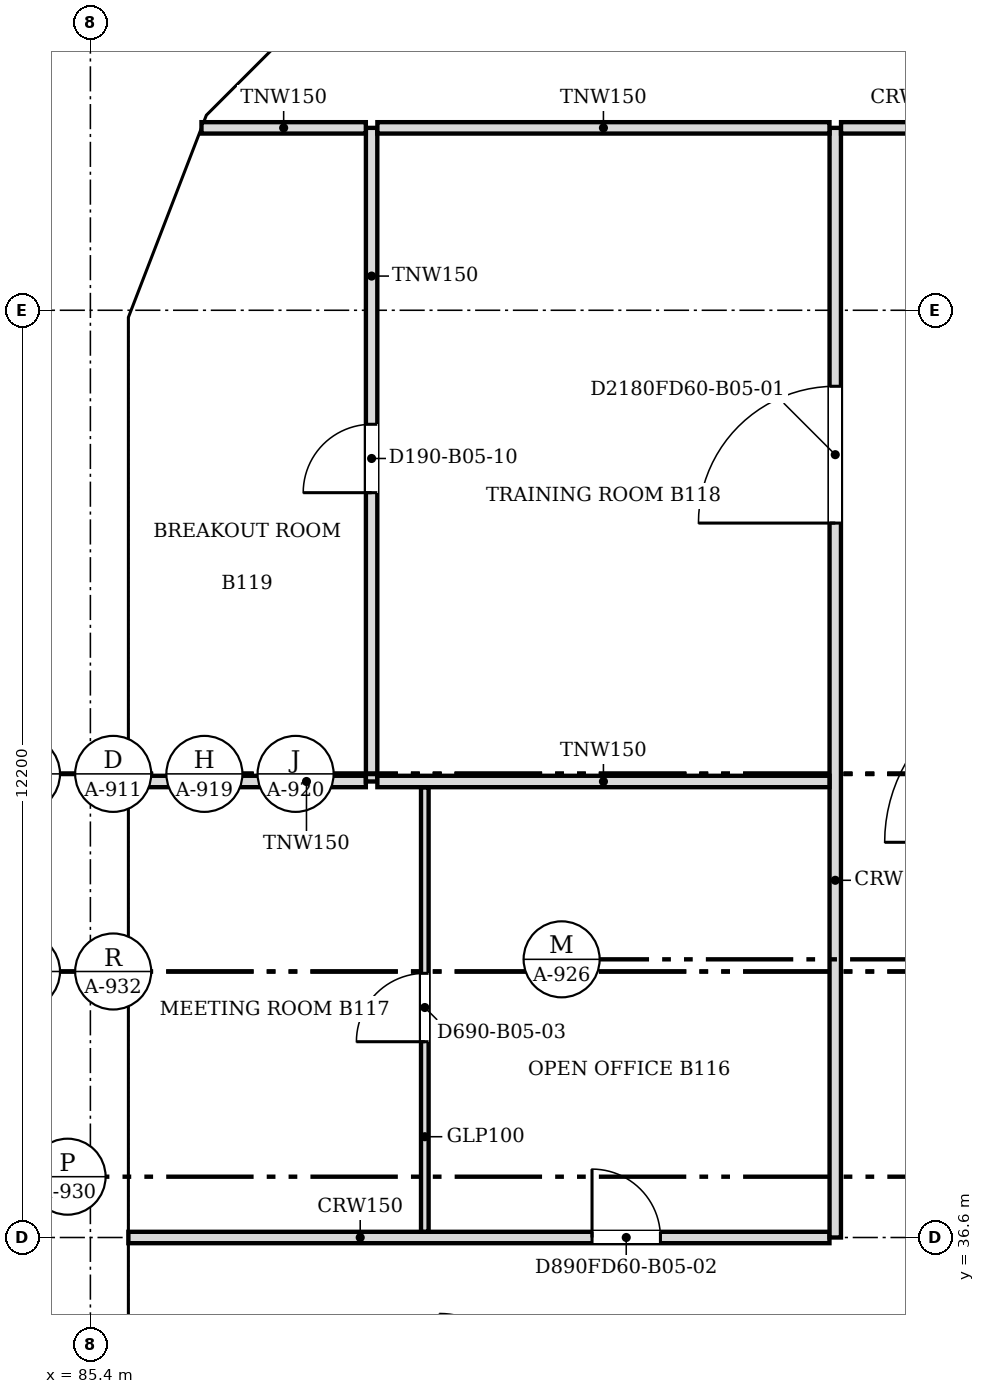
"""IFC4 building model, lengths in metres.
Left out: names, types, materials, properties, quantities, classifications, styles, units other than length and angle.
Written with IfcOpenShell. Run it as: python <this file> out.ifc"""

import sys

from ifc_helpers import new_model, si_unit, direction, frame, frame_2d, origin, place, context, subcontext, project, spatial, polyline, rectangle, outline, extrude, faceted_brep, source, transform, mapped, element, fill, save


model = new_model("IFC4")
c1 = context("Model", 3, precision=1e-05, world=origin(), true_north=direction((0.0, 1.0)))
c2 = subcontext(c1, "Body", "Model", "MODEL_VIEW")
j1 = project(units=[si_unit("LENGTHUNIT", "METRE"), si_unit("PLANEANGLEUNIT", "RADIAN")], contexts=[c1])
p1 = place(None, origin())
s1 = spatial("IfcSite", under=j1, at=p1, CompositionType="ELEMENT")
p2 = place(p1, origin())
s2 = spatial("IfcBuilding", under=s1, at=p2, CompositionType="ELEMENT")
p3 = place(p2, frame((0.0, 0.0, 48.6)))
s3 = spatial("IfcBuildingStorey", under=s2, at=p3, CompositionType="ELEMENT", Elevation=48.6)
m1 = source(origin(), c2, "Body", "Brep", [
    faceted_brep([(2.944, -0.25, 0.0), (2.997, -0.25, 0.068), (2.997, -0.25, 7.532), (2.944, -0.25, 7.6), (0.0, -0.25, 3.8), (0.053, 0.25, 3.868), (2.891, 0.25, 7.532), (2.891, 0.25, 0.068), (0.053, 0.25, 3.732), (2.944, 0.0, 0.0), (2.944, 0.0, 7.6), (0.0, 0.0, 3.8)], [[[0, 1, 2, 3, 4]], [[5, 6, 7, 8]], [[1, 0, 9]], [[10, 3, 2]], [[6, 5, 11, 4, 3, 10]], [[8, 7, 9, 0, 4, 11]], [[8, 11, 5]], [[1, 9, 7, 6, 10, 2]]]),
])
p4 = place(p3, frame((88.794, 53.588, -3.8), z_axis=(0.0, 0.0, 1.0), x_axis=(-0.707066050402, -0.707147509625, 0.0)))
e1 = element("IfcWall", 1, at=p4, inside=s3, PredefinedType="SOLIDWALL", context=c2, shape_type="MappedRepresentation", body=[
    mapped(m1, transform((0.0, 0.0, 0.0), scale=1.0)),
])
m2 = source(origin(), c2, "Body", "SweptSolid", [
    extrude(outline(polyline([(2.744, 6.934), (0.316, 3.8), (2.744, 0.666), (2.744, 6.934)])), frame((0.0, 0.26, 0.0), z_axis=(0.0, -1.0, 0.0), x_axis=(1.0, 0.0, 0.0)), (0.0, 0.0, 1.0), 0.52),
])
p5 = place(p4, origin())
e2 = element("IfcOpeningElement", 2, at=p5, cuts=e1, PredefinedType="OPENING", context=c2, shape_type="MappedRepresentation", body=[
    mapped(m2, transform((0.0, 0.0, 0.0), scale=1.0)),
])
m3 = source(origin(), c2, "Body", "Brep", [
    faceted_brep([(0.053, -0.25, 0.0), (3.003, -0.25, 3.8), (0.053, -0.25, 7.6), (0.0, -0.25, 7.531), (0.0, -0.25, 0.068), (0.106, 0.25, 7.532), (2.957, 0.25, 3.86), (2.957, 0.25, 3.74), (0.106, 0.25, 0.068), (3.003, 0.0, 3.8), (0.053, 0.0, 0.0), (0.053, 0.0, 7.6)], [[[0, 1, 2, 3, 4]], [[5, 6, 7, 8]], [[8, 7, 9, 1, 0, 10]], [[6, 5, 11, 2, 1, 9]], [[3, 2, 11]], [[10, 0, 4]], [[8, 10, 4, 3, 11, 5]], [[7, 6, 9]]]),
])
p6 = place(p3, frame((86.731, 51.556, -3.8), z_axis=(0.0, 0.0, 1.0), x_axis=(-0.359855894603, -0.933007896601, 0.0)))
e3 = element("IfcWall", 3, at=p6, inside=s3, PredefinedType="SOLIDWALL", context=c2, shape_type="MappedRepresentation", body=[
    mapped(m3, transform((0.0, 0.0, 0.0), scale=1.0)),
])
m4 = source(origin(), c2, "Body", "SweptSolid", [
    extrude(outline(polyline([(0.253, 0.665), (2.687, 3.8), (0.253, 6.935), (0.253, 0.665)])), frame((0.0, 0.26, 0.0), z_axis=(0.0, -1.0, 0.0), x_axis=(1.0, 0.0, 0.0)), (0.0, 0.0, 1.0), 0.52),
])
p7 = place(p6, origin())
e4 = element("IfcOpeningElement", 4, at=p7, cuts=e3, PredefinedType="OPENING", context=c2, shape_type="MappedRepresentation", body=[
    mapped(m4, transform((0.0, 0.0, 0.0), scale=1.0)),
])
m5 = source(origin(), c2, "Body", "Brep", [
    faceted_brep([(3.003, -0.25, 0.0), (6.053, -0.25, 3.8), (3.003, -0.25, 7.6), (0.0, -0.25, 3.8), (0.047, 0.25, 3.859), (3.003, 0.25, 7.6), (6.053, 0.25, 3.8), (3.003, 0.25, 0.0), (0.047, 0.25, 3.741), (0.0, 0.0, 3.8)], [[[0, 1, 2, 3]], [[4, 5, 6, 7, 8]], [[7, 6, 1, 0]], [[6, 5, 2, 1]], [[5, 4, 9, 3, 2]], [[8, 7, 0, 3, 9]], [[8, 9, 4]]]),
])
p8 = place(p3, frame((85.65, 48.753, -3.8), z_axis=(0.0, 0.0, 1.0), x_axis=(0.0, -1.0, 0.0)))
e5 = element("IfcWall", 5, at=p8, inside=s3, PredefinedType="SOLIDWALL", context=c2, shape_type="MappedRepresentation", body=[
    mapped(m5, transform((0.0, 0.0, 0.0), scale=1.0)),
])
m6 = source(origin(), c2, "Body", "SweptSolid", [
    extrude(outline(polyline([(3.005, 0.401), (5.733, 3.8), (3.005, 7.199), (0.319, 3.8), (3.005, 0.401)])), frame((0.0, 0.26, 0.0), z_axis=(0.0, -1.0, 0.0), x_axis=(1.0, 0.0, 0.0)), (0.0, 0.0, 1.0), 0.52),
])
p9 = place(p8, origin())
e6 = element("IfcOpeningElement", 6, at=p9, cuts=e5, PredefinedType="OPENING", context=c2, shape_type="MappedRepresentation", body=[
    mapped(m6, transform((0.0, 0.0, 0.0), scale=1.0)),
])
m7 = source(origin(), c2, "Body", "Brep", [
    faceted_brep([(3.05, -0.25, 0.0), (6.1, -0.25, 3.8), (6.1, -0.25, 3.8), (3.05, -0.25, 7.6), (0.0, -0.25, 3.8), (0.0, 0.25, 3.8), (3.05, 0.25, 7.6), (6.1, 0.25, 3.8), (6.1, 0.25, 3.8), (3.05, 0.25, 0.0)], [[[0, 1, 2, 3, 4]], [[5, 6, 7, 8, 9]], [[9, 8, 1, 0]], [[7, 6, 3, 2]], [[6, 5, 4, 3]], [[5, 9, 0, 4]], [[1, 8, 7, 2]]]),
])
p10 = place(p3, frame((85.65, 42.7, -3.8), z_axis=(0.0, 0.0, 1.0), x_axis=(0.0, -1.0, 0.0)))
e7 = element("IfcWall", 7, at=p10, inside=s3, PredefinedType="SOLIDWALL", context=c2, shape_type="MappedRepresentation", body=[
    mapped(m7, transform((0.0, 0.0, 0.0), scale=1.0)),
])
m8 = source(origin(), c2, "Body", "SweptSolid", [
    extrude(outline(polyline([(3.05, 0.399), (5.78, 3.8), (3.05, 7.2), (0.321, 3.8), (3.05, 0.399)])), frame((0.0, 0.26, 0.0), z_axis=(0.0, -1.0, 0.0), x_axis=(1.0, 0.0, 0.0)), (0.0, 0.0, 1.0), 0.52),
])
p11 = place(p10, origin())
e8 = element("IfcOpeningElement", 8, at=p11, cuts=e7, PredefinedType="OPENING", context=c2, shape_type="MappedRepresentation", body=[
    mapped(m8, transform((0.0, 0.0, 0.0), scale=1.0)),
])
m9 = source(origin(), c2, "Body", "SweptSolid", [
    extrude(outline(polyline([(3.05, 0.0), (6.1, 3.8), (3.05, 7.6), (0.0, 3.8), (3.05, 0.0)])), frame((0.0, 0.25, 0.0), z_axis=(0.0, -1.0, 0.0), x_axis=(1.0, 0.0, 0.0)), (0.0, 0.0, 1.0), 0.5),
])
p12 = place(p3, frame((85.65, 36.6, -3.8), z_axis=(0.0, 0.0, 1.0), x_axis=(0.0, -1.0, 0.0)))
e9 = element("IfcWall", 9, at=p12, inside=s3, PredefinedType="SOLIDWALL", context=c2, shape_type="MappedRepresentation", body=[
    mapped(m9, transform((0.0, 0.0, 0.0), scale=1.0)),
])
p13 = place(p12, origin())
e10 = element("IfcOpeningElement", 10, at=p13, cuts=e9, PredefinedType="OPENING", context=c2, shape_type="MappedRepresentation", body=[
    mapped(m8, transform((0.0, 0.0, 0.0), scale=1.0)),
])
p14 = place(p2, frame((0.0, 0.0, 52.4)))
s4 = spatial("IfcBuildingStorey", under=s2, at=p14, CompositionType="ELEMENT", Elevation=52.4)
m10 = source(origin(), c2, "Body", "Brep", [
    faceted_brep([(0.053, -0.25, 0.0), (2.997, -0.25, 3.8), (0.053, -0.25, 7.6), (0.0, -0.25, 7.532), (0.0, -0.25, 0.068), (0.106, 0.25, 7.531), (2.944, 0.25, 3.868), (2.944, 0.25, 3.732), (0.106, 0.25, 0.068), (2.997, 0.0, 3.8), (0.053, 0.0, 0.0), (0.053, 0.0, 7.6)], [[[0, 1, 2, 3, 4]], [[5, 6, 7, 8]], [[8, 7, 9, 1, 0, 10]], [[6, 5, 11, 2, 1, 9]], [[3, 2, 11]], [[10, 0, 4]], [[8, 10, 4, 3, 11, 5]], [[9, 7, 6]]]),
])
p15 = place(p14, frame((88.831, 53.625, -3.8), z_axis=(0.0, 0.0, 1.0), x_axis=(-0.707147509625, -0.707066050402, 0.0)))
e11 = element("IfcWall", 11, at=p15, inside=s4, PredefinedType="SOLIDWALL", context=c2, shape_type="MappedRepresentation", body=[
    mapped(m10, transform((0.0, 0.0, 0.0), scale=1.0)),
])
m11 = source(origin(), c2, "Body", "SweptSolid", [
    extrude(outline(polyline([(0.253, 0.666), (2.681, 3.8), (0.253, 6.934), (0.253, 0.666)])), frame((0.0, 0.26, 0.0), z_axis=(0.0, -1.0, 0.0), x_axis=(1.0, 0.0, 0.0)), (0.0, 0.0, 1.0), 0.52),
])
p16 = place(p15, origin())
e12 = element("IfcOpeningElement", 12, at=p16, cuts=e11, PredefinedType="OPENING", context=c2, shape_type="MappedRepresentation", body=[
    mapped(m11, transform((0.0, 0.0, 0.0), scale=1.0)),
])
m12 = source(origin(), c2, "Body", "Brep", [
    faceted_brep([(2.95, -0.25, 0.0), (2.997, -0.25, 0.059), (2.997, -0.25, 7.541), (2.95, -0.25, 7.6), (0.0, -0.25, 3.8), (0.053, 0.25, 3.868), (2.904, 0.25, 7.54), (2.904, 0.25, 0.06), (0.053, 0.25, 3.732), (2.95, 0.0, 0.0), (2.95, 0.0, 7.6), (0.0, 0.0, 3.8)], [[[0, 1, 2, 3, 4]], [[5, 6, 7, 8]], [[1, 0, 9]], [[10, 3, 2]], [[6, 5, 11, 4, 3, 10]], [[8, 7, 9, 0, 4, 11]], [[8, 11, 5]], [[1, 9, 7, 6, 10, 2]]]),
])
p17 = place(p14, frame((86.712, 51.506, -3.8), z_axis=(0.0, 0.0, 1.0), x_axis=(-0.359874094142, -0.933000876937, 0.0)))
e13 = element("IfcWall", 13, at=p17, inside=s4, PredefinedType="SOLIDWALL", context=c2, shape_type="MappedRepresentation", body=[
    mapped(m12, transform((0.0, 0.0, 0.0), scale=1.0)),
])
m13 = source(origin(), c2, "Body", "SweptSolid", [
    extrude(outline(polyline([(2.75, 6.935), (0.316, 3.8), (2.75, 0.665), (2.75, 6.935)])), frame((0.0, 0.26, 0.0), z_axis=(0.0, -1.0, 0.0), x_axis=(1.0, 0.0, 0.0)), (0.0, 0.0, 1.0), 0.52),
])
p18 = place(p17, origin())
e14 = element("IfcOpeningElement", 14, at=p18, cuts=e13, PredefinedType="OPENING", context=c2, shape_type="MappedRepresentation", body=[
    mapped(m13, transform((0.0, 0.0, 0.0), scale=1.0)),
])
m14 = source(origin(), c2, "Body", "Brep", [
    faceted_brep([(0.047, -0.25, 0.0), (3.05, -0.25, 3.8), (0.047, -0.25, 7.6), (0.0, -0.25, 7.54), (0.0, -0.25, 0.06), (0.093, 0.25, 7.541), (3.05, 0.25, 3.8), (0.093, 0.25, 0.059), (0.047, 0.0, 0.0), (0.047, 0.0, 7.6)], [[[0, 1, 2, 3, 4]], [[5, 6, 7]], [[7, 6, 1, 0, 8]], [[6, 5, 9, 2, 1]], [[3, 2, 9]], [[8, 0, 4]], [[7, 8, 4, 3, 9, 5]]]),
])
p19 = place(p14, frame((85.65, 48.8, -3.8), z_axis=(0.0, 0.0, 1.0), x_axis=(0.0, -1.0, 0.0)))
e15 = element("IfcWall", 15, at=p19, inside=s4, PredefinedType="SOLIDWALL", context=c2, shape_type="MappedRepresentation", body=[
    mapped(m14, transform((0.0, 0.0, 0.0), scale=1.0)),
])
m15 = source(origin(), c2, "Body", "SweptSolid", [
    extrude(outline(polyline([(0.247, 0.656), (2.731, 3.8), (0.247, 6.944), (0.247, 0.656)])), frame((0.0, 0.26, 0.0), z_axis=(0.0, -1.0, 0.0), x_axis=(1.0, 0.0, 0.0)), (0.0, 0.0, 1.0), 0.52),
])
p20 = place(p19, origin())
e16 = element("IfcOpeningElement", 16, at=p20, cuts=e15, PredefinedType="OPENING", context=c2, shape_type="MappedRepresentation", body=[
    mapped(m15, transform((0.0, 0.0, 0.0), scale=1.0)),
])
m16 = source(origin(), c2, "Body", "SweptSolid", [
    extrude(outline(polyline([(3.05, 0.0), (6.1, 3.8), (3.05, 7.6), (0.0, 3.8), (3.05, 0.0)])), frame((0.0, 0.25, 0.0), z_axis=(0.0, -1.0, 0.0), x_axis=(1.0, 0.0, 0.0)), (0.0, 0.0, 1.0), 0.5),
])
p21 = place(p14, frame((85.65, 45.75, -3.8), z_axis=(0.0, 0.0, 1.0), x_axis=(0.0, -1.0, 0.0)))
e17 = element("IfcWall", 17, at=p21, inside=s4, PredefinedType="SOLIDWALL", context=c2, shape_type="MappedRepresentation", body=[
    mapped(m16, transform((0.0, 0.0, 0.0), scale=1.0)),
])
m17 = source(origin(), c2, "Body", "SweptSolid", [
    extrude(outline(polyline([(3.05, 0.399), (5.78, 3.8), (3.05, 7.2), (0.321, 3.8), (3.05, 0.399)])), frame((0.0, 0.26, 0.0), z_axis=(0.0, -1.0, 0.0), x_axis=(1.0, 0.0, 0.0)), (0.0, 0.0, 1.0), 0.52),
])
p22 = place(p21, origin())
e18 = element("IfcOpeningElement", 18, at=p22, cuts=e17, PredefinedType="OPENING", context=c2, shape_type="MappedRepresentation", body=[
    mapped(m17, transform((0.0, 0.0, 0.0), scale=1.0)),
])
m18 = source(origin(), c2, "Body", "Brep", [
    faceted_brep([(3.05, -0.25, 0.0), (6.1, -0.25, 3.8), (6.1, -0.25, 3.8), (3.05, -0.25, 7.6), (0.0, -0.25, 3.8), (0.0, 0.25, 3.8), (3.05, 0.25, 7.6), (6.1, 0.25, 3.8), (6.1, 0.25, 3.8), (3.05, 0.25, 0.0)], [[[0, 1, 2, 3, 4]], [[5, 6, 7, 8, 9]], [[9, 8, 1, 0]], [[7, 6, 3, 2]], [[6, 5, 4, 3]], [[5, 9, 0, 4]], [[1, 8, 7, 2]]]),
])
p23 = place(p14, frame((85.65, 39.65, -3.8), z_axis=(0.0, 0.0, 1.0), x_axis=(0.0, -1.0, 0.0)))
e19 = element("IfcWall", 19, at=p23, inside=s4, PredefinedType="SOLIDWALL", context=c2, shape_type="MappedRepresentation", body=[
    mapped(m18, transform((0.0, 0.0, 0.0), scale=1.0)),
])
p24 = place(p23, origin())
e20 = element("IfcOpeningElement", 20, at=p24, cuts=e19, PredefinedType="OPENING", context=c2, shape_type="MappedRepresentation", body=[
    mapped(m17, transform((0.0, 0.0, 0.0), scale=1.0)),
])
p25 = place(p3, frame((85.9, 36.6, 0.0), z_axis=(0.0, 0.0, 1.0), x_axis=(1.0, 0.0, 0.0)))
e21 = element("IfcWall", 21, at=p25, inside=s3, PredefinedType="PARTITIONING", context=c2, shape_type="SweptSolid", body=[
    extrude(rectangle(XDim=9.224, YDim=0.15, at=frame_2d((4.612, 0.0))), origin(), (0.0, 0.0, 1.0), 3.067),
])
m19 = source(origin(), c2, "Body", "SweptSolid", [
    extrude(rectangle(XDim=0.9, YDim=2.1, at=frame_2d((0.45, 1.05))), frame((0.0, 0.085, 0.0), z_axis=(0.0, -1.0, 0.0), x_axis=(1.0, 0.0, 0.0)), (0.0, 0.0, 1.0), 0.17),
])
p26 = place(p25, frame((6.1, 0.0, 0.0)))
e22 = element("IfcOpeningElement", 22, at=p26, cuts=e21, PredefinedType="OPENING", context=c2, shape_type="MappedRepresentation", body=[
    mapped(m19, transform((0.0, 0.0, 0.0), scale=1.0)),
])
p27 = place(p3, frame((95.2, 36.6, 0.0), z_axis=(0.0, 0.0, 1.0), x_axis=(0.0, 1.0, 0.0)))
e23 = element("IfcWall", 23, at=p27, inside=s3, PredefinedType="PARTITIONING", context=c2, shape_type="SweptSolid", body=[
    extrude(rectangle(XDim=14.6, YDim=0.15, at=frame_2d((7.3, 0.0))), origin(), (0.0, 0.0, 1.0), 3.067),
])
m20 = source(origin(), c2, "Body", "SweptSolid", [
    extrude(rectangle(XDim=1.8, YDim=2.1, at=frame_2d((0.9, 1.05))), frame((0.0, 0.085, 0.0), z_axis=(0.0, -1.0, 0.0), x_axis=(1.0, 0.0, 0.0)), (0.0, 0.0, 1.0), 0.17),
])
p28 = place(p27, frame((9.4, 0.0, 0.0)))
e24 = element("IfcOpeningElement", 24, at=p28, cuts=e23, PredefinedType="OPENING", context=c2, shape_type="MappedRepresentation", body=[
    mapped(m20, transform((0.0, 0.0, 0.0), scale=1.0)),
])
p29 = place(p3, frame((89.8, 36.676, 0.0), z_axis=(0.0, 0.0, 1.0), x_axis=(0.0, 1.0, 0.0)))
e25 = element("IfcWall", 25, at=p29, inside=s3, PredefinedType="PARTITIONING", context=c2, shape_type="SweptSolid", body=[
    extrude(rectangle(XDim=5.848, YDim=0.1, at=frame_2d((2.924, 0.0))), origin(), (0.0, 0.0, 1.0), 3.067),
])
m21 = source(origin(), c2, "Body", "SweptSolid", [
    extrude(rectangle(XDim=0.9, YDim=2.1, at=frame_2d((0.45, 1.05))), frame((0.0, 0.06, 0.0), z_axis=(0.0, -1.0, 0.0), x_axis=(1.0, 0.0, 0.0)), (0.0, 0.0, 1.0), 0.12),
])
p30 = place(p29, frame((2.5, 0.0, 0.0)))
e26 = element("IfcOpeningElement", 26, at=p30, cuts=e25, PredefinedType="OPENING", context=c2, shape_type="MappedRepresentation", body=[
    mapped(m21, transform((0.0, 0.0, 0.0), scale=1.0)),
])
p31 = place(p3, frame((85.9, 42.6, 0.0), z_axis=(0.0, 0.0, 1.0), x_axis=(1.0, 0.0, 0.0)))
e27 = element("IfcWall", 27, at=p31, inside=s3, PredefinedType="PARTITIONING", context=c2, shape_type="SweptSolid", body=[
    extrude(rectangle(XDim=3.124, YDim=0.15, at=frame_2d((1.562, 0.0))), origin(), (0.0, 0.0, 1.0), 3.067),
])
p32 = place(p3, frame((89.1, 42.6, 0.0), z_axis=(0.0, 0.0, 1.0), x_axis=(0.0, 1.0, 0.0)))
e28 = element("IfcWall", 28, at=p32, inside=s3, PredefinedType="PARTITIONING", context=c2, shape_type="SweptSolid", body=[
    extrude(rectangle(XDim=8.6, YDim=0.15, at=frame_2d((4.3, 0.0))), origin(), (0.0, 0.0, 1.0), 3.067),
])
p33 = place(p32, frame((3.8, 0.0, 0.0)))
e29 = element("IfcOpeningElement", 29, at=p33, cuts=e28, PredefinedType="OPENING", context=c2, shape_type="MappedRepresentation", body=[
    mapped(m19, transform((0.0, 0.0, 0.0), scale=1.0)),
])
p34 = place(p3, frame((89.176, 42.6, 0.0), z_axis=(0.0, 0.0, 1.0), x_axis=(1.0, 0.0, 0.0)))
e30 = element("IfcWall", 30, at=p34, inside=s3, PredefinedType="PARTITIONING", context=c2, shape_type="SweptSolid", body=[
    extrude(rectangle(XDim=5.948, YDim=0.15, at=frame_2d((2.974, 0.0))), origin(), (0.0, 0.0, 1.0), 3.067),
])
p35 = place(p3, frame((86.862, 51.2, 0.0), z_axis=(0.0, 0.0, 1.0), x_axis=(1.0, 0.0, 0.0)))
e31 = element("IfcWall", 31, at=p35, inside=s3, PredefinedType="PARTITIONING", context=c2, shape_type="SweptSolid", body=[
    extrude(rectangle(XDim=2.162, YDim=0.15, at=frame_2d((1.081, 0.0))), origin(), (0.0, 0.0, 1.0), 3.067),
])
p36 = place(p3, frame((89.176, 51.2, 0.0), z_axis=(0.0, 0.0, 1.0), x_axis=(1.0, 0.0, 0.0)))
e32 = element("IfcWall", 32, at=p36, inside=s3, PredefinedType="PARTITIONING", context=c2, shape_type="SweptSolid", body=[
    extrude(rectangle(XDim=5.948, YDim=0.15, at=frame_2d((2.974, 0.0))), origin(), (0.0, 0.0, 1.0), 3.067),
])
p37 = place(p3, frame((95.276, 51.2, 0.0), z_axis=(0.0, 0.0, 1.0), x_axis=(1.0, 0.0, 0.0)))
e33 = element("IfcWall", 33, at=p37, inside=s3, PredefinedType="PARTITIONING", context=c2, shape_type="SweptSolid", body=[
    extrude(rectangle(XDim=4.724, YDim=0.15, at=frame_2d((2.362, 0.0))), origin(), (0.0, 0.0, 1.0), 3.067),
])
m22 = source(origin(), c2, "Body", "SweptSolid", [
    extrude(rectangle(XDim=1.0, YDim=2.1, at=frame_2d((0.5, 1.05))), frame((0.0, 0.085, 0.0), z_axis=(0.0, -1.0, 0.0), x_axis=(1.0, 0.0, 0.0)), (0.0, 0.0, 1.0), 0.17),
])
p38 = place(p37, frame((1.9, 0.0, 0.0)))
e34 = element("IfcOpeningElement", 34, at=p38, cuts=e33, PredefinedType="OPENING", context=c2, shape_type="MappedRepresentation", body=[
    mapped(m22, transform((0.0, 0.0, 0.0), scale=1.0)),
])
m23 = source(origin(), c2, "Body", "SweptSolid", [
    extrude(rectangle(XDim=0.9, YDim=2.1, at=frame_2d((0.45, 1.05))), frame((0.0, 0.025, 0.0), z_axis=(0.0, -1.0, 0.0), x_axis=(1.0, 0.0, 0.0)), (0.0, 0.0, 1.0), 0.05),
])
p39 = place(p30, origin())
e35 = element("IfcDoor", 35, at=p39, inside=s3, OperationType="SINGLE_SWING_LEFT", PredefinedType="DOOR", context=c2, shape_type="MappedRepresentation", body=[
    mapped(m23, transform((0.0, 0.0, 0.0), scale=1.0)),
])
fill(e26, e35)
m24 = source(origin(), c2, "Body", "SweptSolid", [
    extrude(rectangle(XDim=1.8, YDim=2.1, at=frame_2d((0.9, 1.05))), frame((0.0, 0.025, 0.0), z_axis=(0.0, -1.0, 0.0), x_axis=(1.0, 0.0, 0.0)), (0.0, 0.0, 1.0), 0.05),
])
p40 = place(p28, origin())
e36 = element("IfcDoor", 36, at=p40, inside=s3, OperationType="DOUBLE_DOOR_SINGLE_SWING", PredefinedType="DOOR", context=c2, shape_type="MappedRepresentation", body=[
    mapped(m24, transform((0.0, 0.0, 0.0), scale=1.0)),
])
fill(e24, e36)
p41 = place(p33, origin())
e37 = element("IfcDoor", 37, at=p41, inside=s3, OperationType="SINGLE_SWING_LEFT", PredefinedType="DOOR", context=c2, shape_type="MappedRepresentation", body=[
    mapped(m23, transform((0.0, 0.0, 0.0), scale=1.0)),
])
fill(e29, e37)
p42 = place(p26, origin())
e38 = element("IfcDoor", 38, at=p42, inside=s3, OperationType="SINGLE_SWING_LEFT", PredefinedType="DOOR", context=c2, shape_type="MappedRepresentation", body=[
    mapped(m23, transform((0.0, 0.0, 0.0), scale=1.0)),
])
fill(e22, e38)
save(model, sys.argv[1])
